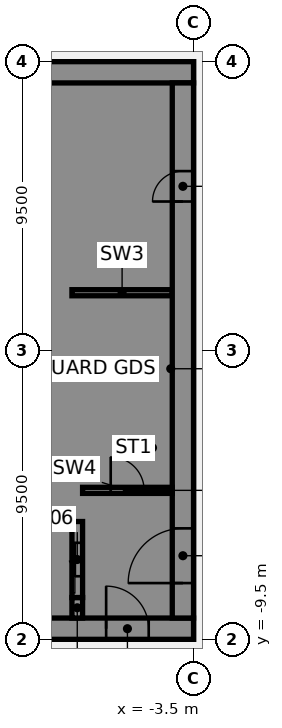
"""IFC4 building model, lengths in metres.
Left out: names, types, materials, properties, quantities, classifications, styles, units other than length and angle.
Written with IfcOpenShell. Run it as: python <this file> out.ifc"""

import sys

from ifc_helpers import new_model, si_unit, direction, frame, frame_2d, origin, place, context, subcontext, project, spatial, polyline, rectangle, outline, extrude, element, fill, save


model = new_model("IFC4")
c1 = context("Model", 3, precision=1e-05, world=origin(), true_north=direction((0.0, 1.0)))
c2 = subcontext(c1, "Body", "Model", "MODEL_VIEW")
j1 = project(units=[si_unit("LENGTHUNIT", "METRE"), si_unit("PLANEANGLEUNIT", "RADIAN")], contexts=[c1])
p1 = place(None, origin())
s1 = spatial("IfcSite", under=j1, at=p1, CompositionType="ELEMENT")
p2 = place(p1, origin())
s2 = spatial("IfcBuilding", under=s1, at=p2, CompositionType="ELEMENT")
p3 = place(p2, frame((0.0, 0.0, 34.0)))
s3 = spatial("IfcBuildingStorey", under=s2, at=p3, CompositionType="ELEMENT", Elevation=34.0)
p4 = place(p3, frame((-16.5, -9.15, 0.0), z_axis=(0.0, 0.0, 1.0), x_axis=(1.0, 0.0, 0.0)))
e1 = element("IfcWall", 1, at=p4, inside=s3, PredefinedType="SHEAR", context=c2, shape_type="SweptSolid", body=[
    extrude(rectangle(XDim=13.0, YDim=0.7, at=frame_2d((6.5, 0.0))), origin(), (0.0, 0.0, 1.0), 3.61),
])
p5 = place(p4, frame((4.15, 0.0, 0.0)))
e2 = element("IfcOpeningElement", 2, at=p5, cuts=e1, PredefinedType="OPENING", context=c2, shape_type="SweptSolid", body=[
    extrude(rectangle(XDim=1.4, YDim=2.1, at=frame_2d((0.7, 1.05))), frame((0.0, 0.36, 0.0), z_axis=(0.0, -1.0, 0.0), x_axis=(1.0, 0.0, 0.0)), (0.0, 0.0, 1.0), 0.72),
])
p6 = place(p4, frame((10.125, 0.0, 0.0)))
e3 = element("IfcOpeningElement", 3, at=p6, cuts=e1, PredefinedType="OPENING", context=c2, shape_type="SweptSolid", body=[
    extrude(rectangle(XDim=1.4, YDim=2.1, at=frame_2d((0.7, 1.05))), frame((0.0, 0.36, 0.0), z_axis=(0.0, -1.0, 0.0), x_axis=(1.0, 0.0, 0.0)), (0.0, 0.0, 1.0), 0.72),
])
p7 = place(p3, frame((-16.5, 9.15, 0.0), z_axis=(0.0, 0.0, 1.0), x_axis=(1.0, 0.0, 0.0)))
e4 = element("IfcWall", 4, at=p7, inside=s3, PredefinedType="SHEAR", context=c2, shape_type="SweptSolid", body=[
    extrude(rectangle(XDim=13.0, YDim=0.7, at=frame_2d((6.5, 0.0))), origin(), (0.0, 0.0, 1.0), 3.61),
])
p8 = place(p3, origin())
e5 = element("IfcWall", 5, at=p8, inside=s3, PredefinedType="SHEAR", context=c2, shape_type="SweptSolid", body=[
    extrude(outline(polyline([(-9.8, -5.375), (-9.8, -5.625), (-7.5, -5.625), (-7.15, -5.625), (-7.15, 8.8), (-7.5, 8.8), (-9.8, 8.8), (-9.8, 8.125), (-7.5, 8.125), (-7.5, 5.625), (-9.8, 5.625), (-9.8, 5.375), (-7.5, 5.375), (-7.5, 2.875), (-9.8, 2.875), (-9.8, 2.625), (-7.5, 2.625), (-7.5, 0.125), (-9.8, 0.125), (-9.8, -0.125), (-7.5, -0.125), (-7.5, -2.625), (-9.8, -2.625), (-9.8, -2.875), (-7.5, -2.875), (-7.5, -5.375), (-9.8, -5.375)])), origin(), (0.0, 0.0, 1.0), 3.61),
])
p9 = place(p3, origin())
e6 = element("IfcWall", 6, at=p9, inside=s3, PredefinedType="SHEAR", context=c2, shape_type="SweptSolid", body=[
    extrude(outline(polyline([(-7.5, -8.125), (-9.55, -8.125), (-9.55, -5.625), (-9.8, -5.625), (-9.8, -8.125), (-9.8, -8.8), (-7.5, -8.8), (-7.5, -8.125)])), origin(), (0.0, 0.0, 1.0), 3.61),
])
p10 = place(p3, frame((-7.325, -8.8, 0.0), z_axis=(0.0, 0.0, 1.0), x_axis=(0.0, 1.0, 0.0)))
e7 = element("IfcWall", 7, at=p10, inside=s3, PredefinedType="SHEAR", context=c2, shape_type="SweptSolid", body=[
    extrude(rectangle(XDim=0.675, YDim=0.35, at=frame_2d((0.337, 0.0))), origin(), (0.0, 0.0, 1.0), 3.61),
])
p11 = place(p3, frame((-7.5, 1.9, 0.0), z_axis=(0.0, 0.0, 1.0), x_axis=(1.0, 0.0, 0.0)))
e8 = element("IfcWall", 8, at=p11, inside=s3, PredefinedType="SHEAR", context=c2, shape_type="SweptSolid", body=[
    extrude(rectangle(XDim=3.3, YDim=0.2, at=frame_2d((1.65, 0.0))), origin(), (0.0, 0.0, 1.0), 3.61),
])
p12 = place(p3, frame((-7.325, -8.125, 0.0), z_axis=(0.0, 0.0, 1.0), x_axis=(0.0, 1.0, 0.0)))
e9 = element("IfcWall", 9, at=p12, inside=s3, PredefinedType="SHEAR", context=c2, shape_type="SweptSolid", body=[
    extrude(rectangle(XDim=2.5, YDim=0.35, at=frame_2d((1.25, 0.0))), origin(), (0.0, 0.0, 1.0), 3.61),
])
p13 = place(p12, frame((0.7, 0.0, 0.0)))
e10 = element("IfcOpeningElement", 10, at=p13, cuts=e9, PredefinedType="OPENING", context=c2, shape_type="SweptSolid", body=[
    extrude(rectangle(XDim=1.1, YDim=2.1, at=frame_2d((0.55, 1.05))), frame((0.0, 0.185, 0.0), z_axis=(0.0, -1.0, 0.0), x_axis=(1.0, 0.0, 0.0)), (0.0, 0.0, 1.0), 0.37),
])
p14 = place(p3, frame((-3.85, -8.8, 0.0), z_axis=(0.0, 0.0, 1.0), x_axis=(0.0, 1.0, 0.0)))
e11 = element("IfcWall", 11, at=p14, inside=s3, PredefinedType="SHEAR", context=c2, shape_type="SweptSolid", body=[
    extrude(rectangle(XDim=17.6, YDim=0.7, at=frame_2d((8.8, 0.0))), origin(), (0.0, 0.0, 1.0), 3.61),
])
p15 = place(p14, frame((1.15, 0.0, 0.0)))
e12 = element("IfcOpeningElement", 12, at=p15, cuts=e11, PredefinedType="OPENING", context=c2, shape_type="SweptSolid", body=[
    extrude(rectangle(XDim=1.8, YDim=2.1, at=frame_2d((0.9, 1.05))), frame((0.0, 0.36, 0.0), z_axis=(0.0, -1.0, 0.0), x_axis=(1.0, 0.0, 0.0)), (0.0, 0.0, 1.0), 0.72),
])
p16 = place(p14, frame((13.7, 0.0, 0.0)))
e13 = element("IfcOpeningElement", 13, at=p16, cuts=e11, PredefinedType="OPENING", context=c2, shape_type="SweptSolid", body=[
    extrude(rectangle(XDim=1.0, YDim=2.1, at=frame_2d((0.5, 1.05))), frame((0.0, 0.36, 0.0), z_axis=(0.0, -1.0, 0.0), x_axis=(1.0, 0.0, 0.0)), (0.0, 0.0, 1.0), 0.72),
])
p17 = place(p3, frame((-7.15, -4.6, 0.0), z_axis=(0.0, 0.0, 1.0), x_axis=(1.0, 0.0, 0.0)))
e14 = element("IfcWall", 14, at=p17, inside=s3, PredefinedType="SHEAR", context=c2, shape_type="SweptSolid", body=[
    extrude(rectangle(XDim=2.95, YDim=0.2, at=frame_2d((1.475, 0.0))), origin(), (0.0, 0.0, 1.0), 3.61),
])
p18 = place(p17, frame((0.925, 0.0, 0.0)))
e15 = element("IfcOpeningElement", 15, at=p18, cuts=e14, PredefinedType="OPENING", context=c2, shape_type="SweptSolid", body=[
    extrude(rectangle(XDim=1.1, YDim=2.1, at=frame_2d((0.55, 1.05))), frame((0.0, 0.11, 0.0), z_axis=(0.0, -1.0, 0.0), x_axis=(1.0, 0.0, 0.0)), (0.0, 0.0, 1.0), 0.22),
])
p19 = place(p6, origin())
e16 = element("IfcDoor", 16, at=p19, inside=s3, OperationType="SINGLE_SWING_LEFT", PredefinedType="DOOR", context=c2, shape_type="SweptSolid", body=[
    extrude(rectangle(XDim=1.4, YDim=2.1, at=frame_2d((0.7, 1.05))), frame((0.0, 0.025, 0.0), z_axis=(0.0, -1.0, 0.0), x_axis=(1.0, 0.0, 0.0)), (0.0, 0.0, 1.0), 0.05),
])
fill(e3, e16)
p20 = place(p15, origin())
e17 = element("IfcDoor", 17, at=p20, inside=s3, OperationType="SINGLE_SWING_LEFT", PredefinedType="DOOR", context=c2, shape_type="SweptSolid", body=[
    extrude(rectangle(XDim=1.8, YDim=2.1, at=frame_2d((0.9, 1.05))), frame((0.0, 0.025, 0.0), z_axis=(0.0, -1.0, 0.0), x_axis=(1.0, 0.0, 0.0)), (0.0, 0.0, 1.0), 0.05),
])
fill(e12, e17)
p21 = place(p16, origin())
e18 = element("IfcDoor", 18, at=p21, inside=s3, OperationType="SINGLE_SWING_LEFT", PredefinedType="DOOR", context=c2, shape_type="SweptSolid", body=[
    extrude(rectangle(XDim=1.0, YDim=2.1, at=frame_2d((0.5, 1.05))), frame((0.0, 0.025, 0.0), z_axis=(0.0, -1.0, 0.0), x_axis=(1.0, 0.0, 0.0)), (0.0, 0.0, 1.0), 0.05),
])
fill(e13, e18)
p22 = place(p18, origin())
e19 = element("IfcDoor", 19, at=p22, inside=s3, OperationType="SINGLE_SWING_LEFT", PredefinedType="DOOR", context=c2, shape_type="SweptSolid", body=[
    extrude(rectangle(XDim=1.1, YDim=2.1, at=frame_2d((0.55, 1.05))), frame((0.0, 0.025, 0.0), z_axis=(0.0, -1.0, 0.0), x_axis=(1.0, 0.0, 0.0)), (0.0, 0.0, 1.0), 0.05),
])
fill(e15, e19)
p23 = place(p13, origin())
e20 = element("IfcDoor", 20, at=p23, inside=s3, OperationType="SLIDING_TO_LEFT", PredefinedType="DOOR", context=c2, shape_type="SweptSolid", body=[
    extrude(rectangle(XDim=1.1, YDim=2.1, at=frame_2d((0.55, 1.05))), frame((0.0, 0.025, 0.0), z_axis=(0.0, -1.0, 0.0), x_axis=(1.0, 0.0, 0.0)), (0.0, 0.0, 1.0), 0.05),
])
fill(e10, e20)
save(model, sys.argv[1])
